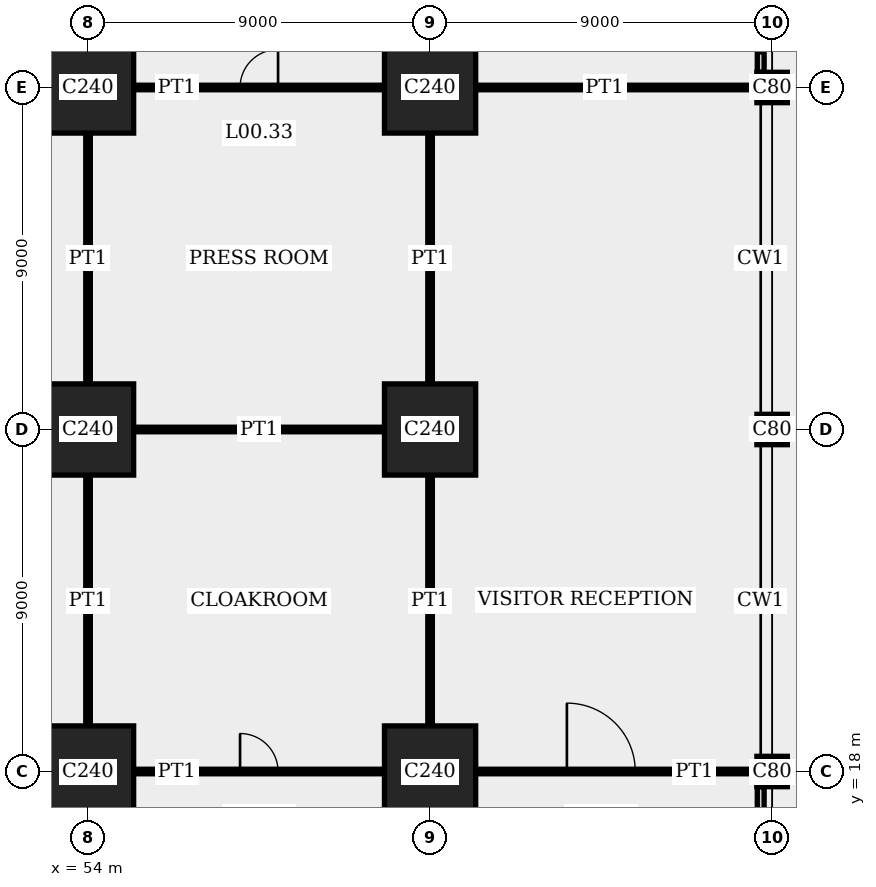
"""IFC4 building model, lengths in metres.
Left out: names, types, materials, properties, quantities, classifications, styles, units other than length and angle.
Written with IfcOpenShell. Run it as: python <this file> out.ifc"""

import sys

from ifc_helpers import new_model, si_unit, direction, frame, frame_2d, origin, origin_2d, place, context, subcontext, project, spatial, rectangle, extrude, element, fill, save


model = new_model("IFC4")
c1 = context("Model", 3, precision=1e-05, world=origin(), true_north=direction((0.0, 1.0)))
c2 = subcontext(c1, "Body", "Model", "MODEL_VIEW")
j1 = project(units=[si_unit("LENGTHUNIT", "METRE"), si_unit("PLANEANGLEUNIT", "RADIAN")], contexts=[c1])
p1 = place(None, origin())
s1 = spatial("IfcSite", under=j1, at=p1, CompositionType="ELEMENT")
p2 = place(p1, origin())
s2 = spatial("IfcBuilding", under=s1, at=p2, CompositionType="ELEMENT")
p3 = place(p2, origin())
s3 = spatial("IfcBuildingStorey", under=s2, at=p3, CompositionType="ELEMENT", Elevation=0.0)
for number, where, z_axis, x_axis in (
    (1, (54.0, 18.0, 0.0), (0.0, 0.0, 1.0), (1.0, 0.0, 0.0)),
    (2, (54.0, 27.0, 0.0), (0.0, 0.0, 1.0), (1.0, 0.0, 0.0)),
    (3, (54.0, 36.0, 0.0), (0.0, 0.0, 1.0), (1.0, 0.0, 0.0)),
    (4, (63.0, 18.0, 0.0), (0.0, 0.0, 1.0), (1.0, 0.0, 0.0)),
    (5, (63.0, 27.0, 0.0), (0.0, 0.0, 1.0), (1.0, 0.0, 0.0)),
    (6, (63.0, 36.0, 0.0), (0.0, 0.0, 1.0), (1.0, 0.0, 0.0)),
):
    element("IfcColumn", number, at=place(p3, frame(where, z_axis=z_axis, x_axis=x_axis)), inside=s3, PredefinedType="COLUMN", context=c2, shape_type="SweptSolid", body=[
        extrude(rectangle(XDim=2.4, YDim=2.4, at=origin_2d()), origin(), (0.0, 0.0, 1.0), 5.4),
    ])
for number, where, z_axis, x_axis in (
    (7, (72.0, 18.0, 0.0), (0.0, 0.0, 1.0), (1.0, 0.0, 0.0)),
    (8, (72.0, 27.0, 0.0), (0.0, 0.0, 1.0), (1.0, 0.0, 0.0)),
    (9, (72.0, 36.0, 0.0), (0.0, 0.0, 1.0), (1.0, 0.0, 0.0)),
):
    element("IfcColumn", number, at=place(p3, frame(where, z_axis=z_axis, x_axis=x_axis)), inside=s3, PredefinedType="COLUMN", context=c2, shape_type="SweptSolid", body=[
        extrude(rectangle(XDim=0.8, YDim=0.8, at=origin_2d()), origin(), (0.0, 0.0, 1.0), 5.4),
    ])
p4 = place(p3, frame((71.7, 9.4, 0.0), z_axis=(0.0, 0.0, 1.0), x_axis=(0.0, 1.0, 0.0)))
e10 = element("IfcWall", 10, at=p4, inside=s3, PredefinedType="SOLIDWALL", context=c2, shape_type="SweptSolid", body=[
    extrude(rectangle(XDim=8.2, YDim=0.18, at=frame_2d((4.1, 0.0))), origin(), (0.0, 0.0, 1.0), 4.3),
])
p5 = place(p4, frame((1.95, 0.0, 0.0)))
e11 = element("IfcOpeningElement", 11, at=p5, cuts=e10, PredefinedType="OPENING", context=c2, shape_type="SweptSolid", body=[
    extrude(rectangle(XDim=2.0, YDim=3.0, at=frame_2d((1.0, 1.5))), frame((0.0, 0.1, 0.0), z_axis=(0.0, -1.0, 0.0), x_axis=(1.0, 0.0, 0.0)), (0.0, 0.0, 1.0), 0.2),
])
p6 = place(p4, frame((4.25, 0.0, 0.0)))
e12 = element("IfcOpeningElement", 12, at=p6, cuts=e10, PredefinedType="OPENING", context=c2, shape_type="SweptSolid", body=[
    extrude(rectangle(XDim=2.0, YDim=3.0, at=frame_2d((1.0, 1.5))), frame((0.0, 0.1, 0.0), z_axis=(0.0, -1.0, 0.0), x_axis=(1.0, 0.0, 0.0)), (0.0, 0.0, 1.0), 0.2),
])
p7 = place(p3, frame((71.7, 36.4, 0.0), z_axis=(0.0, 0.0, 1.0), x_axis=(0.0, 1.0, 0.0)))
e13 = element("IfcWall", 13, at=p7, inside=s3, PredefinedType="SOLIDWALL", context=c2, shape_type="SweptSolid", body=[
    extrude(rectangle(XDim=8.2, YDim=0.18, at=frame_2d((4.1, 0.0))), origin(), (0.0, 0.0, 1.0), 4.3),
])
p8 = place(p7, frame((3.2, 0.0, 0.0)))
e14 = element("IfcOpeningElement", 14, at=p8, cuts=e13, PredefinedType="OPENING", context=c2, shape_type="SweptSolid", body=[
    extrude(rectangle(XDim=1.8, YDim=2.4, at=frame_2d((0.9, 1.2))), frame((0.0, 0.1, 0.0), z_axis=(0.0, -1.0, 0.0), x_axis=(1.0, 0.0, 0.0)), (0.0, 0.0, 1.0), 0.2),
])
p9 = place(p7, frame((0.5, 0.0, 0.3)))
e15 = element("IfcOpeningElement", 15, at=p9, cuts=e13, PredefinedType="OPENING", context=c2, shape_type="SweptSolid", body=[
    extrude(rectangle(XDim=1.5, YDim=2.4, at=frame_2d((0.75, 1.2))), frame((0.0, 0.1, 0.0), z_axis=(0.0, -1.0, 0.0), x_axis=(1.0, 0.0, 0.0)), (0.0, 0.0, 1.0), 0.2),
])
p10 = place(p7, frame((6.2, 0.0, 0.3)))
e16 = element("IfcOpeningElement", 16, at=p10, cuts=e13, PredefinedType="OPENING", context=c2, shape_type="SweptSolid", body=[
    extrude(rectangle(XDim=1.5, YDim=2.4, at=frame_2d((0.75, 1.2))), frame((0.0, 0.1, 0.0), z_axis=(0.0, -1.0, 0.0), x_axis=(1.0, 0.0, 0.0)), (0.0, 0.0, 1.0), 0.2),
])
p11 = place(p3, frame((55.2, 18.0, 0.0), z_axis=(0.0, 0.0, 1.0), x_axis=(1.0, 0.0, 0.0)))
e17 = element("IfcWall", 17, at=p11, inside=s3, PredefinedType="PARTITIONING", context=c2, shape_type="SweptSolid", body=[
    extrude(rectangle(XDim=6.6, YDim=0.12, at=frame_2d((3.3, 0.0))), origin(), (0.0, 0.0, 1.0), 4.3),
])
p12 = place(p11, frame((2.8, 0.0, 0.0)))
e18 = element("IfcOpeningElement", 18, at=p12, cuts=e17, PredefinedType="OPENING", context=c2, shape_type="SweptSolid", body=[
    extrude(rectangle(XDim=1.0, YDim=2.4, at=frame_2d((0.5, 1.2))), frame((0.0, 0.07, 0.0), z_axis=(0.0, -1.0, 0.0), x_axis=(1.0, 0.0, 0.0)), (0.0, 0.0, 1.0), 0.14),
])
p13 = place(p3, frame((64.2, 18.0, 0.0), z_axis=(0.0, 0.0, 1.0), x_axis=(1.0, 0.0, 0.0)))
e19 = element("IfcWall", 19, at=p13, inside=s3, PredefinedType="PARTITIONING", context=c2, shape_type="SweptSolid", body=[
    extrude(rectangle(XDim=7.4, YDim=0.12, at=frame_2d((3.7, 0.0))), origin(), (0.0, 0.0, 1.0), 4.3),
])
p14 = place(p13, frame((2.4, 0.0, 0.0)))
e20 = element("IfcOpeningElement", 20, at=p14, cuts=e19, PredefinedType="OPENING", context=c2, shape_type="SweptSolid", body=[
    extrude(rectangle(XDim=1.8, YDim=2.7, at=frame_2d((0.9, 1.35))), frame((0.0, 0.07, 0.0), z_axis=(0.0, -1.0, 0.0), x_axis=(1.0, 0.0, 0.0)), (0.0, 0.0, 1.0), 0.14),
])
p15 = place(p3, frame((55.2, 36.0, 0.0), z_axis=(0.0, 0.0, 1.0), x_axis=(1.0, 0.0, 0.0)))
e21 = element("IfcWall", 21, at=p15, inside=s3, PredefinedType="PARTITIONING", context=c2, shape_type="SweptSolid", body=[
    extrude(rectangle(XDim=6.6, YDim=0.12, at=frame_2d((3.3, 0.0))), origin(), (0.0, 0.0, 1.0), 4.3),
])
p16 = place(p15, frame((2.8, 0.0, 0.0)))
e22 = element("IfcOpeningElement", 22, at=p16, cuts=e21, PredefinedType="OPENING", context=c2, shape_type="SweptSolid", body=[
    extrude(rectangle(XDim=1.0, YDim=2.4, at=frame_2d((0.5, 1.2))), frame((0.0, 0.07, 0.0), z_axis=(0.0, -1.0, 0.0), x_axis=(1.0, 0.0, 0.0)), (0.0, 0.0, 1.0), 0.14),
])
p17 = place(p3, frame((64.2, 36.0, 0.0), z_axis=(0.0, 0.0, 1.0), x_axis=(1.0, 0.0, 0.0)))
e23 = element("IfcWall", 23, at=p17, inside=s3, PredefinedType="PARTITIONING", context=c2, shape_type="SweptSolid", body=[
    extrude(rectangle(XDim=7.4, YDim=0.12, at=frame_2d((3.7, 0.0))), origin(), (0.0, 0.0, 1.0), 4.3),
])
for number, where, z_axis, x_axis in (
    (24, (63.0, 19.2, 0.0), (0.0, 0.0, 1.0), (0.0, 1.0, 0.0)),
    (25, (63.0, 28.2, 0.0), (0.0, 0.0, 1.0), (0.0, 1.0, 0.0)),
    (26, (54.0, 19.2, 0.0), (0.0, 0.0, 1.0), (0.0, 1.0, 0.0)),
    (27, (54.0, 28.2, 0.0), (0.0, 0.0, 1.0), (0.0, 1.0, 0.0)),
    (28, (55.2, 27.0, 0.0), (0.0, 0.0, 1.0), (1.0, 0.0, 0.0)),
):
    element("IfcWall", number, at=place(p3, frame(where, z_axis=z_axis, x_axis=x_axis)), inside=s3, PredefinedType="PARTITIONING", context=c2, shape_type="SweptSolid", body=[
        extrude(rectangle(XDim=6.6, YDim=0.12, at=frame_2d((3.3, 0.0))), origin(), (0.0, 0.0, 1.0), 4.3),
    ])
p18 = place(p9, origin())
e29 = element("IfcWindow", 29, at=p18, inside=s3, PartitioningType="SINGLE_PANEL", PredefinedType="WINDOW", context=c2, shape_type="SweptSolid", body=[
    extrude(rectangle(XDim=1.5, YDim=2.4, at=frame_2d((0.75, 1.2))), frame((0.0, 0.03, 0.0), z_axis=(0.0, -1.0, 0.0), x_axis=(1.0, 0.0, 0.0)), (0.0, 0.0, 1.0), 0.06),
])
fill(e15, e29)
p19 = place(p12, origin())
e30 = element("IfcDoor", 30, at=p19, inside=s3, OperationType="SINGLE_SWING_RIGHT", PredefinedType="DOOR", context=c2, shape_type="SweptSolid", body=[
    extrude(rectangle(XDim=1.0, YDim=2.4, at=frame_2d((0.5, 1.2))), frame((0.0, 0.025, 0.0), z_axis=(0.0, -1.0, 0.0), x_axis=(1.0, 0.0, 0.0)), (0.0, 0.0, 1.0), 0.05),
])
fill(e18, e30)
p20 = place(p14, origin())
e31 = element("IfcDoor", 31, at=p20, inside=s3, OperationType="DOUBLE_DOOR_DOUBLE_SWING", PredefinedType="DOOR", context=c2, shape_type="SweptSolid", body=[
    extrude(rectangle(XDim=1.8, YDim=2.7, at=frame_2d((0.9, 1.35))), frame((0.0, 0.025, 0.0), z_axis=(0.0, -1.0, 0.0), x_axis=(1.0, 0.0, 0.0)), (0.0, 0.0, 1.0), 0.05),
])
fill(e20, e31)
p21 = place(p16, origin())
e32 = element("IfcDoor", 32, at=p21, inside=s3, OperationType="SINGLE_SWING_LEFT", PredefinedType="DOOR", context=c2, shape_type="SweptSolid", body=[
    extrude(rectangle(XDim=1.0, YDim=2.4, at=frame_2d((0.5, 1.2))), frame((0.0, 0.025, 0.0), z_axis=(0.0, -1.0, 0.0), x_axis=(1.0, 0.0, 0.0)), (0.0, 0.0, 1.0), 0.05),
])
fill(e22, e32)
save(model, sys.argv[1])
